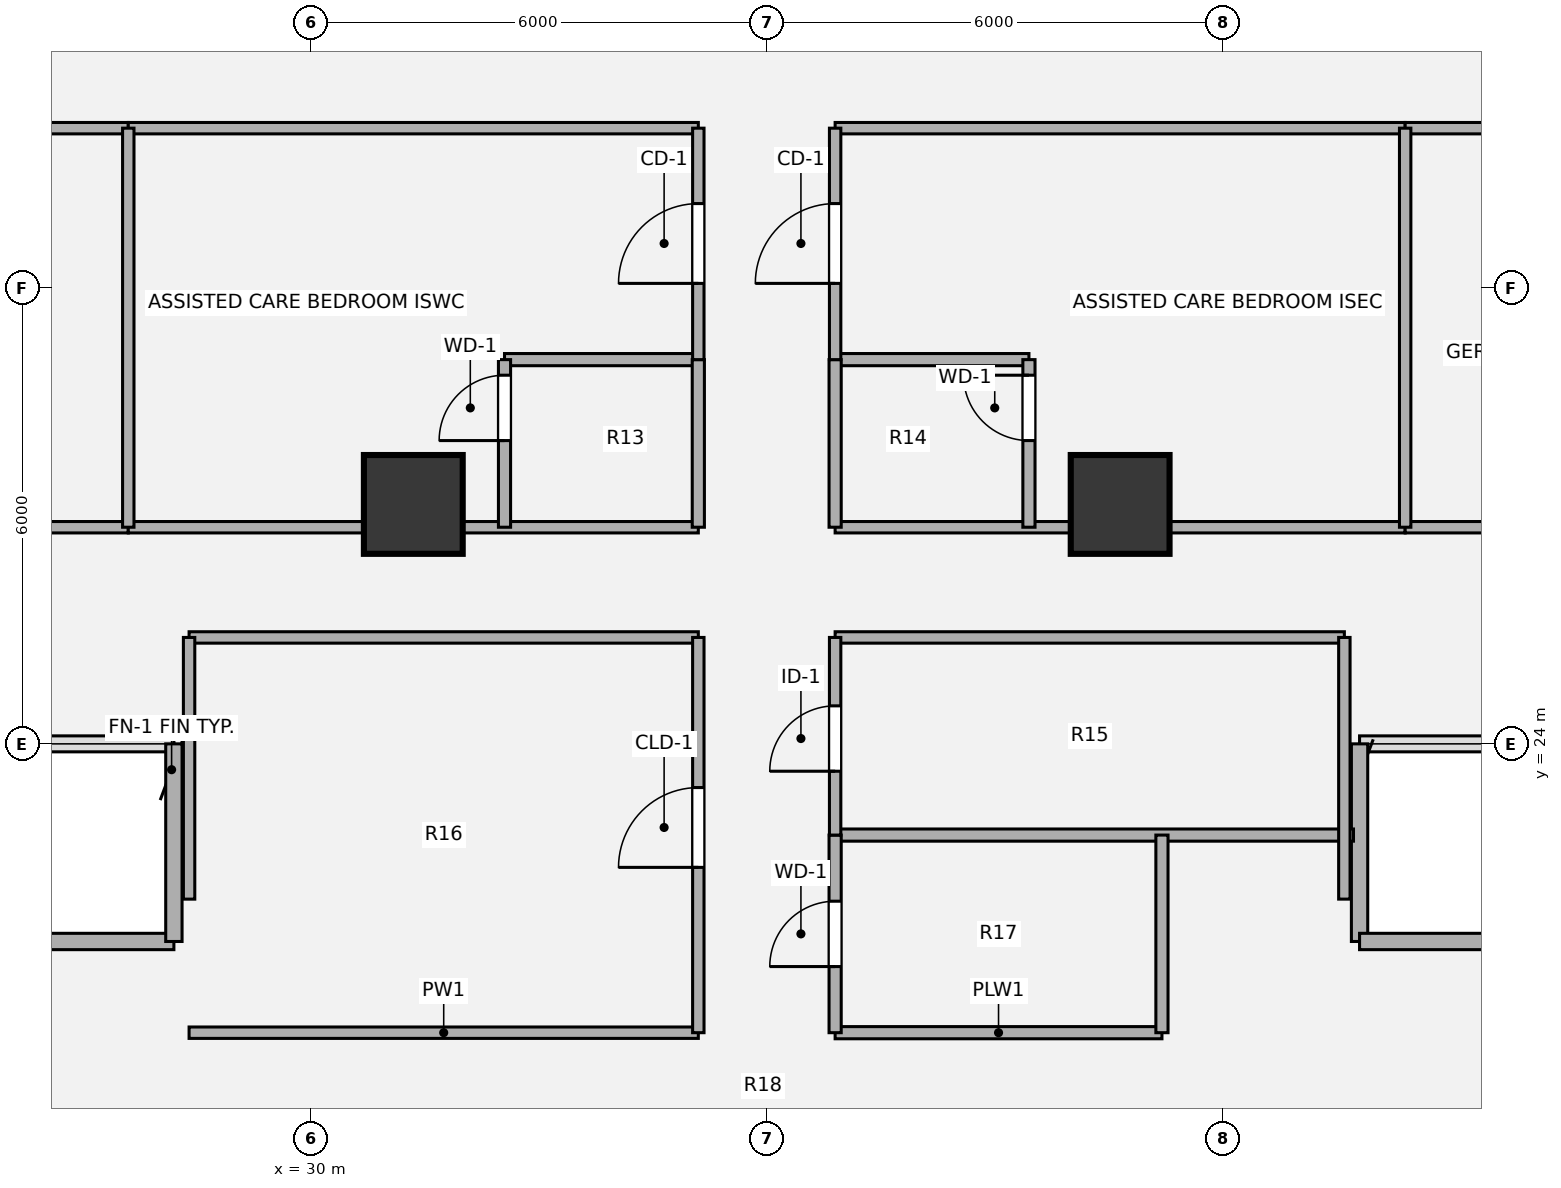
"""IFC4 building model, lengths in metres.
Left out: names, types, materials, properties, quantities, classifications, styles, units other than length and angle.
Written with IfcOpenShell. Run it as: python <this file> out.ifc"""

import sys

from ifc_helpers import new_model, si_unit, direction, frame, frame_2d, origin, origin_2d, place, context, subcontext, project, spatial, rectangle, hollow_circle, extrude, source, transform, mapped, element, fill, save


model = new_model("IFC4")
c1 = context("Model", 3, precision=1e-05, world=origin(), true_north=direction((0.0, 1.0)))
c2 = subcontext(c1, "Body", "Model", "MODEL_VIEW")
j1 = project(units=[si_unit("LENGTHUNIT", "METRE"), si_unit("PLANEANGLEUNIT", "RADIAN")], contexts=[c1])
p1 = place(None, origin())
s1 = spatial("IfcSite", under=j1, at=p1, CompositionType="ELEMENT")
p2 = place(p1, origin())
s2 = spatial("IfcBuilding", under=s1, at=p2, CompositionType="ELEMENT")
p3 = place(p2, frame((0.0, 0.0, 104.94)))
s3 = spatial("IfcBuildingStorey", under=s2, at=p3, CompositionType="ELEMENT", Elevation=104.94)
m1 = source(origin(), c2, "Body", "SweptSolid", [
    extrude(hollow_circle(Radius=0.65, WallThickness=0.045, at=origin_2d()), origin(), (0.0, 0.0, 1.0), 3.78),
])
for number, where, z_axis, x_axis in (
    (1, (31.35, 27.15, 0.0), (0.0, 0.0, 1.0), (1.0, 0.0, 0.0)),
    (2, (40.65, 27.15, 0.0), (0.0, 0.0, 1.0), (1.0, 0.0, 0.0)),
):
    element("IfcColumn", number, at=place(p3, frame(where, z_axis=z_axis, x_axis=x_axis)), inside=s3, PredefinedType="COLUMN", context=c2, shape_type="MappedRepresentation", body=[
        mapped(m1, transform((0.0, 0.0, 0.0), x_axis=(1.0, 0.0, 0.0), y_axis=(0.0, 1.0, 0.0), z_axis=(0.0, 0.0, 1.0), scale=1.0)),
    ])
p4 = place(p3, frame((24.35, 21.4, 0.0), z_axis=(0.0, 0.0, 1.0), x_axis=(1.0, 0.0, 0.0)))
e3 = element("IfcWall", 3, at=p4, inside=s3, PredefinedType="SOLIDWALL", context=c2, shape_type="SweptSolid", body=[
    extrude(rectangle(XDim=3.85, YDim=0.215, at=frame_2d((1.925, 0.0))), origin(), (0.0, 0.0, 1.0), 3.53),
])
for number, where, z_axis, x_axis in (
    (4, (28.2, 21.4, 0.0), (0.0, 0.0, 1.0), (0.0, 1.0, 0.0)),
    (5, (43.8, 24.0, 0.0), (0.0, 0.0, 1.0), (0.0, -1.0, 0.0)),
):
    element("IfcWall", number, at=place(p3, frame(where, z_axis=z_axis, x_axis=x_axis)), inside=s3, PredefinedType="SOLIDWALL", context=c2, shape_type="SweptSolid", body=[
        extrude(rectangle(XDim=2.6, YDim=0.215, at=frame_2d((1.3, 0.0))), origin(), (0.0, 0.0, 1.0), 3.53),
    ])
p5 = place(p3, frame((43.8, 21.4, 0.0), z_axis=(0.0, 0.0, 1.0), x_axis=(1.0, 0.0, 0.0)))
e6 = element("IfcWall", 6, at=p5, inside=s3, PredefinedType="SOLIDWALL", context=c2, shape_type="SweptSolid", body=[
    extrude(rectangle(XDim=3.85, YDim=0.215, at=frame_2d((1.925, 0.0))), origin(), (0.0, 0.0, 1.0), 3.53),
])
p6 = place(p3, frame((28.4, 20.2, 0.0), z_axis=(0.0, 0.0, 1.0), x_axis=(1.0, 0.0, 0.0)))
e7 = element("IfcWall", 7, at=p6, inside=s3, PredefinedType="PARTITIONING", context=c2, shape_type="SweptSolid", body=[
    extrude(rectangle(XDim=6.7, YDim=0.15, at=frame_2d((3.35, 0.0))), origin(), (0.0, 0.0, 1.0), 3.5),
])
p7 = place(p3, frame((36.9, 20.2, 0.0), z_axis=(0.0, 0.0, 1.0), x_axis=(1.0, 0.0, 0.0)))
e8 = element("IfcWall", 8, at=p7, inside=s3, PredefinedType="PLUMBINGWALL", context=c2, shape_type="SweptSolid", body=[
    extrude(rectangle(XDim=4.3, YDim=0.16, at=frame_2d((2.15, 0.0))), origin(), (0.0, 0.0, 1.0), 3.5),
])
p8 = place(p3, frame((36.9, 22.8, 0.0), z_axis=(0.0, 0.0, 1.0), x_axis=(1.0, 0.0, 0.0)))
e9 = element("IfcWall", 9, at=p8, inside=s3, PredefinedType="PLUMBINGWALL", context=c2, shape_type="SweptSolid", body=[
    extrude(rectangle(XDim=6.82, YDim=0.16, at=frame_2d((3.41, 0.0))), origin(), (0.0, 0.0, 1.0), 3.5),
])
for number, where, z_axis, x_axis in (
    (10, (28.4, 25.4, 0.0), (0.0, 0.0, 1.0), (1.0, 0.0, 0.0)),
    (11, (36.9, 25.4, 0.0), (0.0, 0.0, 1.0), (1.0, 0.0, 0.0)),
):
    element("IfcWall", number, at=place(p3, frame(where, z_axis=z_axis, x_axis=x_axis)), inside=s3, PredefinedType="PARTITIONING", context=c2, shape_type="SweptSolid", body=[
        extrude(rectangle(XDim=6.7, YDim=0.15, at=frame_2d((3.35, 0.0))), origin(), (0.0, 0.0, 1.0), 3.5),
    ])
p9 = place(p3, frame((22.4, 26.85, 0.0), z_axis=(0.0, 0.0, 1.0), x_axis=(1.0, 0.0, 0.0)))
e12 = element("IfcWall", 12, at=p9, inside=s3, PredefinedType="PARTITIONING", context=c2, shape_type="SweptSolid", body=[
    extrude(rectangle(XDim=5.2, YDim=0.15, at=frame_2d((2.6, 0.0))), origin(), (0.0, 0.0, 1.0), 3.055),
])
for number, where, z_axis, x_axis in (
    (13, (27.6, 26.85, 0.0), (0.0, 0.0, 1.0), (1.0, 0.0, 0.0)),
    (14, (36.9, 26.85, 0.0), (0.0, 0.0, 1.0), (1.0, 0.0, 0.0)),
):
    element("IfcWall", number, at=place(p3, frame(where, z_axis=z_axis, x_axis=x_axis)), inside=s3, PredefinedType="PARTITIONING", context=c2, shape_type="SweptSolid", body=[
        extrude(rectangle(XDim=7.5, YDim=0.15, at=frame_2d((3.75, 0.0))), origin(), (0.0, 0.0, 1.0), 2.903),
    ])
p10 = place(p3, frame((44.4, 26.85, 0.0), z_axis=(0.0, 0.0, 1.0), x_axis=(1.0, 0.0, 0.0)))
e15 = element("IfcWall", 15, at=p10, inside=s3, PredefinedType="PARTITIONING", context=c2, shape_type="SweptSolid", body=[
    extrude(rectangle(XDim=5.2, YDim=0.15, at=frame_2d((2.6, 0.0))), origin(), (0.0, 0.0, 1.0), 3.055),
])
for number, where, z_axis, x_axis in (
    (16, (32.55, 29.055, 0.0), (0.0, 0.0, 1.0), (1.0, 0.0, 0.0)),
    (17, (36.9, 29.055, 0.0), (0.0, 0.0, 1.0), (1.0, 0.0, 0.0)),
):
    element("IfcWall", number, at=place(p3, frame(where, z_axis=z_axis, x_axis=x_axis)), inside=s3, PredefinedType="PLUMBINGWALL", context=c2, shape_type="SweptSolid", body=[
        extrude(rectangle(XDim=2.55, YDim=0.16, at=frame_2d((1.275, 0.0))), origin(), (0.0, 0.0, 1.0), 3.259),
    ])
p11 = place(p3, frame((22.4, 32.1, 0.0), z_axis=(0.0, 0.0, 1.0), x_axis=(1.0, 0.0, 0.0)))
e18 = element("IfcWall", 18, at=p11, inside=s3, PredefinedType="PARTITIONING", context=c2, shape_type="SweptSolid", body=[
    extrude(rectangle(XDim=5.2, YDim=0.15, at=frame_2d((2.6, 0.0))), origin(), (0.0, 0.0, 1.0), 2.982),
])
p12 = place(p11, frame((2.075, 0.0, 0.0)))
e19 = element("IfcOpeningElement", 19, at=p12, cuts=e18, PredefinedType="OPENING", context=c2, shape_type="SweptSolid", body=[
    extrude(rectangle(XDim=1.05, YDim=2.1, at=origin_2d()), frame((0.525, 0.085, 1.05), z_axis=(0.0, -1.0, 0.0), x_axis=(1.0, 0.0, 0.0)), (0.0, 0.0, 1.0), 0.17),
])
for number, where, z_axis, x_axis in (
    (20, (27.6, 32.1, 0.0), (0.0, 0.0, 1.0), (1.0, 0.0, 0.0)),
    (21, (36.9, 32.1, 0.0), (0.0, 0.0, 1.0), (1.0, 0.0, 0.0)),
):
    element("IfcWall", number, at=place(p3, frame(where, z_axis=z_axis, x_axis=x_axis)), inside=s3, PredefinedType="PARTITIONING", context=c2, shape_type="SweptSolid", body=[
        extrude(rectangle(XDim=7.5, YDim=0.15, at=frame_2d((3.75, 0.0))), origin(), (0.0, 0.0, 1.0), 2.982),
    ])
p13 = place(p3, frame((44.4, 32.1, 0.0), z_axis=(0.0, 0.0, 1.0), x_axis=(1.0, 0.0, 0.0)))
e22 = element("IfcWall", 22, at=p13, inside=s3, PredefinedType="PARTITIONING", context=c2, shape_type="SweptSolid", body=[
    extrude(rectangle(XDim=5.2, YDim=0.15, at=frame_2d((2.6, 0.0))), origin(), (0.0, 0.0, 1.0), 2.982),
])
p14 = place(p13, frame((2.075, 0.0, 0.0)))
e23 = element("IfcOpeningElement", 23, at=p14, cuts=e22, PredefinedType="OPENING", context=c2, shape_type="SweptSolid", body=[
    extrude(rectangle(XDim=1.05, YDim=2.1, at=origin_2d()), frame((0.525, 0.085, 1.05), z_axis=(0.0, -1.0, 0.0), x_axis=(1.0, 0.0, 0.0)), (0.0, 0.0, 1.0), 0.17),
])
p15 = place(p3, frame((27.6, 26.85, 0.0), z_axis=(0.0, 0.0, 1.0), x_axis=(0.0, 1.0, 0.0)))
e24 = element("IfcWall", 24, at=p15, inside=s3, PredefinedType="PARTITIONING", context=c2, shape_type="SweptSolid", body=[
    extrude(rectangle(XDim=5.25, YDim=0.15, at=frame_2d((2.625, 0.0))), origin(), (0.0, 0.0, 1.0), 3.5),
])
p16 = place(p3, frame((28.4, 21.957, 0.0), z_axis=(0.0, 0.0, 1.0), x_axis=(0.0, 1.0, 0.0)))
e25 = element("IfcWall", 25, at=p16, inside=s3, PredefinedType="PARTITIONING", context=c2, shape_type="SweptSolid", body=[
    extrude(rectangle(XDim=3.443, YDim=0.15, at=frame_2d((1.721, 0.0))), origin(), (0.0, 0.0, 1.0), 3.5),
])
p17 = place(p3, frame((32.55, 26.85, 0.0), z_axis=(0.0, 0.0, 1.0), x_axis=(0.0, 1.0, 0.0)))
e26 = element("IfcWall", 26, at=p17, inside=s3, PredefinedType="PLUMBINGWALL", context=c2, shape_type="SweptSolid", body=[
    extrude(rectangle(XDim=2.205, YDim=0.16, at=frame_2d((1.103, 0.0))), origin(), (0.0, 0.0, 1.0), 3.5),
])
p18 = place(p17, frame((1.14, 0.0, 0.0)))
e27 = element("IfcOpeningElement", 27, at=p18, cuts=e26, PredefinedType="OPENING", context=c2, shape_type="SweptSolid", body=[
    extrude(rectangle(XDim=0.86, YDim=2.1, at=origin_2d()), frame((0.43, 0.09, 1.05), z_axis=(0.0, -1.0, 0.0), x_axis=(1.0, 0.0, 0.0)), (0.0, 0.0, 1.0), 0.18),
])
p19 = place(p3, frame((35.1, 20.2, 0.0), z_axis=(0.0, 0.0, 1.0), x_axis=(0.0, 1.0, 0.0)))
e28 = element("IfcWall", 28, at=p19, inside=s3, PredefinedType="PARTITIONING", context=c2, shape_type="SweptSolid", body=[
    extrude(rectangle(XDim=5.2, YDim=0.15, at=frame_2d((2.6, 0.0))), origin(), (0.0, 0.0, 1.0), 3.5),
])
p20 = place(p19, frame((2.175, 0.0, 0.0)))
e29 = element("IfcOpeningElement", 29, at=p20, cuts=e28, PredefinedType="OPENING", context=c2, shape_type="SweptSolid", body=[
    extrude(rectangle(XDim=1.05, YDim=2.1, at=origin_2d()), frame((0.525, 0.085, 1.05), z_axis=(0.0, -1.0, 0.0), x_axis=(1.0, 0.0, 0.0)), (0.0, 0.0, 1.0), 0.17),
])
p21 = place(p3, frame((35.1, 26.85, 0.0), z_axis=(0.0, 0.0, 1.0), x_axis=(0.0, 1.0, 0.0)))
e30 = element("IfcWall", 30, at=p21, inside=s3, PredefinedType="PLUMBINGWALL", context=c2, shape_type="SweptSolid", body=[
    extrude(rectangle(XDim=2.205, YDim=0.16, at=frame_2d((1.103, 0.0))), origin(), (0.0, 0.0, 1.0), 3.5),
])
p22 = place(p3, frame((35.1, 29.055, 0.0), z_axis=(0.0, 0.0, 1.0), x_axis=(0.0, 1.0, 0.0)))
e31 = element("IfcWall", 31, at=p22, inside=s3, PredefinedType="PARTITIONING", context=c2, shape_type="SweptSolid", body=[
    extrude(rectangle(XDim=3.045, YDim=0.15, at=frame_2d((1.522, 0.0))), origin(), (0.0, 0.0, 1.0), 3.5),
])
p23 = place(p22, frame((1.003, 0.0, 0.0)))
e32 = element("IfcOpeningElement", 32, at=p23, cuts=e31, PredefinedType="OPENING", context=c2, shape_type="SweptSolid", body=[
    extrude(rectangle(XDim=1.05, YDim=2.1, at=origin_2d()), frame((0.525, 0.085, 1.05), z_axis=(0.0, -1.0, 0.0), x_axis=(1.0, 0.0, 0.0)), (0.0, 0.0, 1.0), 0.17),
])
p24 = place(p3, frame((36.9, 20.2, 0.0), z_axis=(0.0, 0.0, 1.0), x_axis=(0.0, 1.0, 0.0)))
e33 = element("IfcWall", 33, at=p24, inside=s3, PredefinedType="PLUMBINGWALL", context=c2, shape_type="SweptSolid", body=[
    extrude(rectangle(XDim=2.6, YDim=0.16, at=frame_2d((1.3, 0.0))), origin(), (0.0, 0.0, 1.0), 3.5),
])
p25 = place(p24, frame((0.87, 0.0, 0.0)))
e34 = element("IfcOpeningElement", 34, at=p25, cuts=e33, PredefinedType="OPENING", context=c2, shape_type="SweptSolid", body=[
    extrude(rectangle(XDim=0.86, YDim=2.1, at=origin_2d()), frame((0.43, 0.09, 1.05), z_axis=(0.0, -1.0, 0.0), x_axis=(1.0, 0.0, 0.0)), (0.0, 0.0, 1.0), 0.18),
])
p26 = place(p3, frame((36.9, 22.8, 0.0), z_axis=(0.0, 0.0, 1.0), x_axis=(0.0, 1.0, 0.0)))
e35 = element("IfcWall", 35, at=p26, inside=s3, PredefinedType="PARTITIONING", context=c2, shape_type="SweptSolid", body=[
    extrude(rectangle(XDim=2.6, YDim=0.15, at=frame_2d((1.3, 0.0))), origin(), (0.0, 0.0, 1.0), 3.5),
])
p27 = place(p26, frame((0.84, 0.0, 0.0)))
e36 = element("IfcOpeningElement", 36, at=p27, cuts=e35, PredefinedType="OPENING", context=c2, shape_type="SweptSolid", body=[
    extrude(rectangle(XDim=0.86, YDim=2.1, at=origin_2d()), frame((0.43, 0.085, 1.05), z_axis=(0.0, -1.0, 0.0), x_axis=(1.0, 0.0, 0.0)), (0.0, 0.0, 1.0), 0.17),
])
p28 = place(p3, frame((36.9, 26.85, 0.0), z_axis=(0.0, 0.0, 1.0), x_axis=(0.0, 1.0, 0.0)))
e37 = element("IfcWall", 37, at=p28, inside=s3, PredefinedType="PLUMBINGWALL", context=c2, shape_type="SweptSolid", body=[
    extrude(rectangle(XDim=2.205, YDim=0.16, at=frame_2d((1.103, 0.0))), origin(), (0.0, 0.0, 1.0), 3.5),
])
p29 = place(p3, frame((36.9, 29.055, 0.0), z_axis=(0.0, 0.0, 1.0), x_axis=(0.0, 1.0, 0.0)))
e38 = element("IfcWall", 38, at=p29, inside=s3, PredefinedType="PARTITIONING", context=c2, shape_type="SweptSolid", body=[
    extrude(rectangle(XDim=3.045, YDim=0.15, at=frame_2d((1.522, 0.0))), origin(), (0.0, 0.0, 1.0), 3.5),
])
p30 = place(p29, frame((1.003, 0.0, 0.0)))
e39 = element("IfcOpeningElement", 39, at=p30, cuts=e38, PredefinedType="OPENING", context=c2, shape_type="SweptSolid", body=[
    extrude(rectangle(XDim=1.05, YDim=2.1, at=origin_2d()), frame((0.525, 0.085, 1.05), z_axis=(0.0, -1.0, 0.0), x_axis=(1.0, 0.0, 0.0)), (0.0, 0.0, 1.0), 0.17),
])
p31 = place(p3, frame((39.45, 26.85, 0.0), z_axis=(0.0, 0.0, 1.0), x_axis=(0.0, 1.0, 0.0)))
e40 = element("IfcWall", 40, at=p31, inside=s3, PredefinedType="PLUMBINGWALL", context=c2, shape_type="SweptSolid", body=[
    extrude(rectangle(XDim=2.205, YDim=0.16, at=frame_2d((1.103, 0.0))), origin(), (0.0, 0.0, 1.0), 3.5),
])
p32 = place(p31, frame((1.14, 0.0, 0.0)))
e41 = element("IfcOpeningElement", 41, at=p32, cuts=e40, PredefinedType="OPENING", context=c2, shape_type="SweptSolid", body=[
    extrude(rectangle(XDim=0.86, YDim=2.1, at=origin_2d()), frame((0.43, 0.09, 1.05), z_axis=(0.0, -1.0, 0.0), x_axis=(1.0, 0.0, 0.0)), (0.0, 0.0, 1.0), 0.18),
])
p33 = place(p3, frame((41.2, 20.2, 0.0), z_axis=(0.0, 0.0, 1.0), x_axis=(0.0, 1.0, 0.0)))
e42 = element("IfcWall", 42, at=p33, inside=s3, PredefinedType="PLUMBINGWALL", context=c2, shape_type="SweptSolid", body=[
    extrude(rectangle(XDim=2.6, YDim=0.16, at=frame_2d((1.3, 0.0))), origin(), (0.0, 0.0, 1.0), 2.815),
])
p34 = place(p3, frame((43.6, 21.958, 0.0), z_axis=(0.0, 0.0, 1.0), x_axis=(0.0, 1.0, 0.0)))
e43 = element("IfcWall", 43, at=p34, inside=s3, PredefinedType="PARTITIONING", context=c2, shape_type="SweptSolid", body=[
    extrude(rectangle(XDim=3.442, YDim=0.15, at=frame_2d((1.721, 0.0))), origin(), (0.0, 0.0, 1.0), 3.5),
])
p35 = place(p3, frame((44.4, 26.85, 0.0), z_axis=(0.0, 0.0, 1.0), x_axis=(0.0, 1.0, 0.0)))
e44 = element("IfcWall", 44, at=p35, inside=s3, PredefinedType="PARTITIONING", context=c2, shape_type="SweptSolid", body=[
    extrude(rectangle(XDim=5.25, YDim=0.15, at=frame_2d((2.625, 0.0))), origin(), (0.0, 0.0, 1.0), 3.5),
])
m2 = source(origin(), c2, "Body", "SweptSolid", [
    extrude(rectangle(XDim=0.86, YDim=2.1, at=origin_2d()), frame((0.43, 0.025, 1.05), z_axis=(0.0, -1.0, 0.0), x_axis=(1.0, 0.0, 0.0)), (0.0, 0.0, 1.0), 0.05),
])
p36 = place(p18, origin())
e45 = element("IfcDoor", 45, at=p36, inside=s3, OperationType="SINGLE_SWING_LEFT", PredefinedType="DOOR", context=c2, shape_type="MappedRepresentation", body=[
    mapped(m2, transform((0.0, 0.0, 0.0), x_axis=(1.0, 0.0, 0.0), y_axis=(0.0, 1.0, 0.0), z_axis=(0.0, 0.0, 1.0), scale=1.0)),
])
fill(e27, e45)
m3 = source(origin(), c2, "Body", "SweptSolid", [
    extrude(rectangle(XDim=1.05, YDim=2.1, at=origin_2d()), frame((0.525, 0.025, 1.05), z_axis=(0.0, -1.0, 0.0), x_axis=(1.0, 0.0, 0.0)), (0.0, 0.0, 1.0), 0.05),
])
p37 = place(p20, origin())
e46 = element("IfcDoor", 46, at=p37, inside=s3, OperationType="SINGLE_SWING_LEFT", PredefinedType="DOOR", context=c2, shape_type="MappedRepresentation", body=[
    mapped(m3, transform((0.0, 0.0, 0.0), x_axis=(1.0, 0.0, 0.0), y_axis=(0.0, 1.0, 0.0), z_axis=(0.0, 0.0, 1.0), scale=1.0)),
])
fill(e29, e46)
m4 = source(origin(), c2, "Body", "SweptSolid", [
    extrude(rectangle(XDim=1.05, YDim=2.1, at=origin_2d()), frame((0.525, 0.025, 1.05), z_axis=(0.0, -1.0, 0.0), x_axis=(1.0, 0.0, 0.0)), (0.0, 0.0, 1.0), 0.05),
])
p38 = place(p23, origin())
e47 = element("IfcDoor", 47, at=p38, inside=s3, OperationType="SINGLE_SWING_LEFT", PredefinedType="DOOR", context=c2, shape_type="MappedRepresentation", body=[
    mapped(m4, transform((0.0, 0.0, 0.0), x_axis=(1.0, 0.0, 0.0), y_axis=(0.0, 1.0, 0.0), z_axis=(0.0, 0.0, 1.0), scale=1.0)),
])
fill(e32, e47)
p39 = place(p25, origin())
e48 = element("IfcDoor", 48, at=p39, inside=s3, OperationType="SINGLE_SWING_LEFT", PredefinedType="DOOR", context=c2, shape_type="MappedRepresentation", body=[
    mapped(m2, transform((0.0, 0.0, 0.0), x_axis=(1.0, 0.0, 0.0), y_axis=(0.0, 1.0, 0.0), z_axis=(0.0, 0.0, 1.0), scale=1.0)),
])
fill(e34, e48)
m5 = source(origin(), c2, "Body", "SweptSolid", [
    extrude(rectangle(XDim=0.86, YDim=2.1, at=origin_2d()), frame((0.43, 0.025, 1.05), z_axis=(0.0, -1.0, 0.0), x_axis=(1.0, 0.0, 0.0)), (0.0, 0.0, 1.0), 0.05),
])
p40 = place(p27, origin())
e49 = element("IfcDoor", 49, at=p40, inside=s3, OperationType="SINGLE_SWING_LEFT", PredefinedType="DOOR", context=c2, shape_type="MappedRepresentation", body=[
    mapped(m5, transform((0.0, 0.0, 0.0), x_axis=(1.0, 0.0, 0.0), y_axis=(0.0, 1.0, 0.0), z_axis=(0.0, 0.0, 1.0), scale=1.0)),
])
fill(e36, e49)
p41 = place(p30, origin())
e50 = element("IfcDoor", 50, at=p41, inside=s3, OperationType="SINGLE_SWING_LEFT", PredefinedType="DOOR", context=c2, shape_type="MappedRepresentation", body=[
    mapped(m4, transform((0.0, 0.0, 0.0), x_axis=(1.0, 0.0, 0.0), y_axis=(0.0, 1.0, 0.0), z_axis=(0.0, 0.0, 1.0), scale=1.0)),
])
fill(e39, e50)
p42 = place(p32, origin())
e51 = element("IfcDoor", 51, at=p42, inside=s3, OperationType="SINGLE_SWING_RIGHT", PredefinedType="DOOR", context=c2, shape_type="MappedRepresentation", body=[
    mapped(m2, transform((0.0, 0.0, 0.0), x_axis=(1.0, 0.0, 0.0), y_axis=(0.0, 1.0, 0.0), z_axis=(0.0, 0.0, 1.0), scale=1.0)),
])
fill(e41, e51)
save(model, sys.argv[1])
